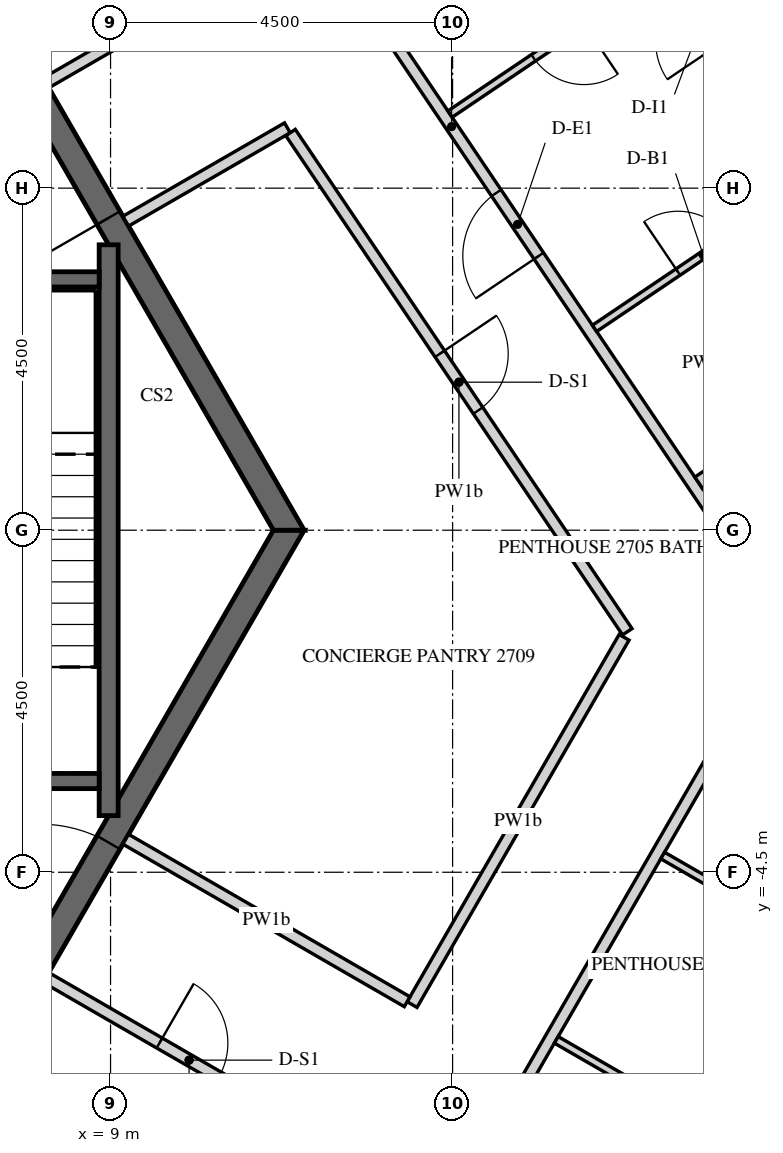
"""IFC4 building model, lengths in metres.
Left out: names, types, materials, properties, quantities, classifications, styles, units other than length and angle.
Written with IfcOpenShell. Run it as: python <this file> out.ifc"""

import sys

from ifc_helpers import new_model, si_unit, direction, frame, frame_2d, origin, place, context, subcontext, project, spatial, polyline, rectangle, outline, extrude, element, fill, save


model = new_model("IFC4")
c1 = context("Model", 3, precision=1e-05, world=origin(), true_north=direction((0.0, 1.0)))
c2 = subcontext(c1, "Body", "Model", "MODEL_VIEW")
j1 = project(units=[si_unit("LENGTHUNIT", "METRE"), si_unit("PLANEANGLEUNIT", "RADIAN")], contexts=[c1])
p1 = place(None, origin())
s1 = spatial("IfcSite", under=j1, at=p1, CompositionType="ELEMENT")
p2 = place(p1, origin())
s2 = spatial("IfcBuilding", under=s1, at=p2, CompositionType="ELEMENT")
p3 = place(p2, frame((0.0, 0.0, 349.5)))
s3 = spatial("IfcBuildingStorey", under=s2, at=p3, CompositionType="ELEMENT", Elevation=349.5)
p4 = place(p3, frame((15.273, -21.097, 0.0), z_axis=(0.0, 0.0, 1.0), x_axis=(0.499997453958, 0.866026873738, 0.0)))
e1 = element("IfcWall", 1, at=p4, inside=s3, PredefinedType="SOLIDWALL", context=c2, shape_type="SweptSolid", body=[
    extrude(outline(polyline([(-0.018, -0.225), (23.152, -0.225), (23.11, 0.225), (0.018, 0.225), (-0.018, -0.225)])), origin(), (0.0, 0.0, 1.0), 3.75),
])
p5 = place(p4, frame((1.366, 0.0, 0.3)))
e2 = element("IfcOpeningElement", 2, at=p5, cuts=e1, PredefinedType="OPENING", context=c2, shape_type="SweptSolid", body=[
    extrude(rectangle(XDim=2.4, YDim=3.0, at=frame_2d((1.2, 1.5))), frame((0.0, 0.235, 0.0), z_axis=(0.0, -1.0, 0.0), x_axis=(1.0, 0.0, 0.0)), (0.0, 0.0, 1.0), 0.47),
])
p6 = place(p4, frame((4.966, 0.0, 0.3)))
e3 = element("IfcOpeningElement", 3, at=p6, cuts=e1, PredefinedType="OPENING", context=c2, shape_type="SweptSolid", body=[
    extrude(rectangle(XDim=2.4, YDim=3.0, at=frame_2d((1.2, 1.5))), frame((0.0, 0.235, 0.0), z_axis=(0.0, -1.0, 0.0), x_axis=(1.0, 0.0, 0.0)), (0.0, 0.0, 1.0), 0.47),
])
p7 = place(p4, frame((8.566, 0.0, 0.3)))
e4 = element("IfcOpeningElement", 4, at=p7, cuts=e1, PredefinedType="OPENING", context=c2, shape_type="SweptSolid", body=[
    extrude(rectangle(XDim=2.4, YDim=3.0, at=frame_2d((1.2, 1.5))), frame((0.0, 0.235, 0.0), z_axis=(0.0, -1.0, 0.0), x_axis=(1.0, 0.0, 0.0)), (0.0, 0.0, 1.0), 0.47),
])
p8 = place(p4, frame((12.166, 0.0, 0.3)))
e5 = element("IfcOpeningElement", 5, at=p8, cuts=e1, PredefinedType="OPENING", context=c2, shape_type="SweptSolid", body=[
    extrude(rectangle(XDim=2.4, YDim=3.0, at=frame_2d((1.2, 1.5))), frame((0.0, 0.235, 0.0), z_axis=(0.0, -1.0, 0.0), x_axis=(1.0, 0.0, 0.0)), (0.0, 0.0, 1.0), 0.47),
])
p9 = place(p4, frame((15.766, 0.0, 0.3)))
e6 = element("IfcOpeningElement", 6, at=p9, cuts=e1, PredefinedType="OPENING", context=c2, shape_type="SweptSolid", body=[
    extrude(rectangle(XDim=2.4, YDim=3.0, at=frame_2d((1.2, 1.5))), frame((0.0, 0.235, 0.0), z_axis=(0.0, -1.0, 0.0), x_axis=(1.0, 0.0, 0.0)), (0.0, 0.0, 1.0), 0.47),
])
p10 = place(p4, frame((19.366, 0.0, 0.3)))
e7 = element("IfcOpeningElement", 7, at=p10, cuts=e1, PredefinedType="OPENING", context=c2, shape_type="SweptSolid", body=[
    extrude(rectangle(XDim=2.4, YDim=3.0, at=frame_2d((1.2, 1.5))), frame((0.0, 0.235, 0.0), z_axis=(0.0, -1.0, 0.0), x_axis=(1.0, 0.0, 0.0)), (0.0, 0.0, 1.0), 0.47),
])
p11 = place(p3, frame((24.37, 2.811, 0.0), z_axis=(0.0, 0.0, 1.0), x_axis=(-0.559187034749, 0.829041531027, 0.0)))
e8 = element("IfcWall", 8, at=p11, inside=s3, PredefinedType="SOLIDWALL", context=c2, shape_type="SweptSolid", body=[
    extrude(outline(polyline([(0.225, -0.225), (20.506, -0.225), (20.957, 0.225), (-0.225, 0.225), (0.225, -0.225)])), origin(), (0.0, 0.0, 1.0), 3.75),
])
p12 = place(p11, frame((0.325, 0.0, 0.9)))
e9 = element("IfcOpeningElement", 9, at=p12, cuts=e8, PredefinedType="OPENING", context=c2, shape_type="SweptSolid", body=[
    extrude(rectangle(XDim=0.9, YDim=1.5, at=frame_2d((0.45, 0.75))), frame((0.0, 0.235, 0.0), z_axis=(0.0, -1.0, 0.0), x_axis=(1.0, 0.0, 0.0)), (0.0, 0.0, 1.0), 0.47),
])
p13 = place(p11, frame((1.525, 0.0, 0.0)))
e10 = element("IfcOpeningElement", 10, at=p13, cuts=e8, PredefinedType="OPENING", context=c2, shape_type="SweptSolid", body=[
    extrude(rectangle(XDim=1.2, YDim=2.4, at=frame_2d((0.6, 1.2))), frame((0.0, 0.235, 0.0), z_axis=(0.0, -1.0, 0.0), x_axis=(1.0, 0.0, 0.0)), (0.0, 0.0, 1.0), 0.47),
])
p14 = place(p11, frame((3.766, 0.0, 0.9)))
e11 = element("IfcOpeningElement", 11, at=p14, cuts=e8, PredefinedType="OPENING", context=c2, shape_type="SweptSolid", body=[
    extrude(rectangle(XDim=0.9, YDim=1.5, at=frame_2d((0.45, 0.75))), frame((0.0, 0.235, 0.0), z_axis=(0.0, -1.0, 0.0), x_axis=(1.0, 0.0, 0.0)), (0.0, 0.0, 1.0), 0.47),
])
p15 = place(p11, frame((4.966, 0.0, 0.0)))
e12 = element("IfcOpeningElement", 12, at=p15, cuts=e8, PredefinedType="OPENING", context=c2, shape_type="SweptSolid", body=[
    extrude(rectangle(XDim=1.2, YDim=2.4, at=frame_2d((0.6, 1.2))), frame((0.0, 0.235, 0.0), z_axis=(0.0, -1.0, 0.0), x_axis=(1.0, 0.0, 0.0)), (0.0, 0.0, 1.0), 0.47),
])
p16 = place(p11, frame((7.366, 0.0, 0.9)))
e13 = element("IfcOpeningElement", 13, at=p16, cuts=e8, PredefinedType="OPENING", context=c2, shape_type="SweptSolid", body=[
    extrude(rectangle(XDim=0.9, YDim=1.5, at=frame_2d((0.45, 0.75))), frame((0.0, 0.235, 0.0), z_axis=(0.0, -1.0, 0.0), x_axis=(1.0, 0.0, 0.0)), (0.0, 0.0, 1.0), 0.47),
])
p17 = place(p11, frame((8.566, 0.0, 0.0)))
e14 = element("IfcOpeningElement", 14, at=p17, cuts=e8, PredefinedType="OPENING", context=c2, shape_type="SweptSolid", body=[
    extrude(rectangle(XDim=1.2, YDim=2.4, at=frame_2d((0.6, 1.2))), frame((0.0, 0.235, 0.0), z_axis=(0.0, -1.0, 0.0), x_axis=(1.0, 0.0, 0.0)), (0.0, 0.0, 1.0), 0.47),
])
p18 = place(p11, frame((10.966, 0.0, 0.9)))
e15 = element("IfcOpeningElement", 15, at=p18, cuts=e8, PredefinedType="OPENING", context=c2, shape_type="SweptSolid", body=[
    extrude(rectangle(XDim=0.9, YDim=1.5, at=frame_2d((0.45, 0.75))), frame((0.0, 0.235, 0.0), z_axis=(0.0, -1.0, 0.0), x_axis=(1.0, 0.0, 0.0)), (0.0, 0.0, 1.0), 0.47),
])
p19 = place(p11, frame((12.166, 0.0, 0.0)))
e16 = element("IfcOpeningElement", 16, at=p19, cuts=e8, PredefinedType="OPENING", context=c2, shape_type="SweptSolid", body=[
    extrude(rectangle(XDim=1.2, YDim=2.4, at=frame_2d((0.6, 1.2))), frame((0.0, 0.235, 0.0), z_axis=(0.0, -1.0, 0.0), x_axis=(1.0, 0.0, 0.0)), (0.0, 0.0, 1.0), 0.47),
])
p20 = place(p11, frame((14.566, 0.0, 0.9)))
e17 = element("IfcOpeningElement", 17, at=p20, cuts=e8, PredefinedType="OPENING", context=c2, shape_type="SweptSolid", body=[
    extrude(rectangle(XDim=0.9, YDim=1.5, at=frame_2d((0.45, 0.75))), frame((0.0, 0.235, 0.0), z_axis=(0.0, -1.0, 0.0), x_axis=(1.0, 0.0, 0.0)), (0.0, 0.0, 1.0), 0.47),
])
p21 = place(p11, frame((15.766, 0.0, 0.0)))
e18 = element("IfcOpeningElement", 18, at=p21, cuts=e8, PredefinedType="OPENING", context=c2, shape_type="SweptSolid", body=[
    extrude(rectangle(XDim=1.2, YDim=2.4, at=frame_2d((0.6, 1.2))), frame((0.0, 0.235, 0.0), z_axis=(0.0, -1.0, 0.0), x_axis=(1.0, 0.0, 0.0)), (0.0, 0.0, 1.0), 0.47),
])
p22 = place(p11, frame((18.007, 0.0, 0.9)))
e19 = element("IfcOpeningElement", 19, at=p22, cuts=e8, PredefinedType="OPENING", context=c2, shape_type="SweptSolid", body=[
    extrude(rectangle(XDim=0.9, YDim=1.5, at=frame_2d((0.45, 0.75))), frame((0.0, 0.235, 0.0), z_axis=(0.0, -1.0, 0.0), x_axis=(1.0, 0.0, 0.0)), (0.0, 0.0, 1.0), 0.47),
])
p23 = place(p11, frame((19.207, 0.0, 0.0)))
e20 = element("IfcOpeningElement", 20, at=p23, cuts=e8, PredefinedType="OPENING", context=c2, shape_type="SweptSolid", body=[
    extrude(rectangle(XDim=1.2, YDim=2.4, at=frame_2d((0.6, 1.2))), frame((0.0, 0.235, 0.0), z_axis=(0.0, -1.0, 0.0), x_axis=(1.0, 0.0, 0.0)), (0.0, 0.0, 1.0), 0.47),
])
p24 = place(p3, frame((5.673, -9.825, 0.0), z_axis=(0.0, 0.0, 1.0), x_axis=(0.499995046907, 0.866028263435, 0.0)))
e21 = element("IfcWall", 21, at=p24, inside=s3, PredefinedType="SHEAR", context=c2, shape_type="SweptSolid", body=[
    extrude(outline(polyline([(-0.101, -0.175), (11.446, -0.175), (11.244, 0.175), (0.101, 0.175), (-0.101, -0.175)])), origin(), (0.0, 0.0, 1.0), 3.75),
])
p25 = place(p24, frame((4.801, 0.0, 0.0)))
e22 = element("IfcOpeningElement", 22, at=p25, cuts=e21, PredefinedType="OPENING", context=c2, shape_type="SweptSolid", body=[
    extrude(rectangle(XDim=1.8, YDim=2.4, at=frame_2d((0.9, 1.2))), frame((0.0, 0.185, 0.0), z_axis=(0.0, -1.0, 0.0), x_axis=(1.0, 0.0, 0.0)), (0.0, 0.0, 1.0), 0.37),
])
p26 = place(p3, frame((11.345, 0.0, 0.0), z_axis=(0.0, 0.0, 1.0), x_axis=(-0.499995046907, 0.866028263435, 0.0)))
e23 = element("IfcWall", 23, at=p26, inside=s3, PredefinedType="SHEAR", context=c2, shape_type="SweptSolid", body=[
    extrude(outline(polyline([(-0.101, -0.175), (11.446, -0.175), (11.244, 0.175), (0.101, 0.175), (-0.101, -0.175)])), origin(), (0.0, 0.0, 1.0), 3.75),
])
p27 = place(p26, frame((4.744, 0.0, 0.0)))
e24 = element("IfcOpeningElement", 24, at=p27, cuts=e23, PredefinedType="OPENING", context=c2, shape_type="SweptSolid", body=[
    extrude(rectangle(XDim=1.8, YDim=2.4, at=frame_2d((0.9, 1.2))), frame((0.0, 0.185, 0.0), z_axis=(0.0, -1.0, 0.0), x_axis=(1.0, 0.0, 0.0)), (0.0, 0.0, 1.0), 0.37),
])
p28 = place(p3, frame((8.975, -3.755, -0.5), z_axis=(0.0, 0.0, 1.0), x_axis=(0.0, 1.0, 0.0)))
e25 = element("IfcWall", 25, at=p28, inside=s3, PredefinedType="SHEAR", context=c2, shape_type="SweptSolid", body=[
    extrude(rectangle(XDim=7.51, YDim=0.25, at=frame_2d((3.755, 0.0))), origin(), (0.0, 0.0, 1.0), 4.15),
])
p29 = place(p3, frame((5.9, 3.3, -0.5), z_axis=(0.0, 0.0, 1.0), x_axis=(1.0, 0.0, 0.0)))
e26 = element("IfcWall", 26, at=p29, inside=s3, PredefinedType="SHEAR", context=c2, shape_type="SweptSolid", body=[
    extrude(rectangle(XDim=2.95, YDim=0.2, at=frame_2d((1.475, 0.0))), origin(), (0.0, 0.0, 1.0), 4.15),
])
p30 = place(p3, frame((5.9, -3.3, -0.5), z_axis=(0.0, 0.0, 1.0), x_axis=(1.0, 0.0, 0.0)))
e27 = element("IfcWall", 27, at=p30, inside=s3, PredefinedType="SHEAR", context=c2, shape_type="SweptSolid", body=[
    extrude(rectangle(XDim=2.95, YDim=0.2, at=frame_2d((1.475, 0.0))), origin(), (0.0, 0.0, 1.0), 4.15),
])
p31 = place(p30, frame((0.875, 0.0, 0.5)))
e28 = element("IfcOpeningElement", 28, at=p31, cuts=e27, PredefinedType="OPENING", context=c2, shape_type="SweptSolid", body=[
    extrude(rectangle(XDim=1.2, YDim=2.4, at=frame_2d((0.6, 1.2))), frame((0.0, 0.11, 0.0), z_axis=(0.0, -1.0, 0.0), x_axis=(1.0, 0.0, 0.0)), (0.0, 0.0, 1.0), 0.22),
])
p32 = place(p3, frame((10.937, -13.357, 0.0), z_axis=(0.0, 0.0, 1.0), x_axis=(0.499993317597, 0.866029261837, 0.0)))
e29 = element("IfcWall", 29, at=p32, inside=s3, PredefinedType="PARTITIONING", context=c2, shape_type="SweptSolid", body=[
    extrude(rectangle(XDim=13.966, YDim=0.15, at=frame_2d((6.983, 0.0))), origin(), (0.0, 0.0, 1.0), 2.82),
])
p33 = place(p32, frame((3.325, 0.0, 0.0)))
e30 = element("IfcOpeningElement", 30, at=p33, cuts=e29, PredefinedType="OPENING", context=c2, shape_type="SweptSolid", body=[
    extrude(rectangle(XDim=1.0, YDim=2.1, at=frame_2d((0.5, 1.05))), frame((0.0, 0.085, 0.0), z_axis=(0.0, -1.0, 0.0), x_axis=(1.0, 0.0, 0.0)), (0.0, 0.0, 1.0), 0.17),
])
p34 = place(p3, frame((17.873, -1.193, 0.0), z_axis=(0.0, 0.0, 1.0), x_axis=(-0.559195650252, 0.829035719821, 0.0)))
e31 = element("IfcWall", 31, at=p34, inside=s3, PredefinedType="PARTITIONING", context=c2, shape_type="SweptSolid", body=[
    extrude(rectangle(XDim=15.688, YDim=0.15, at=frame_2d((7.844, 0.0))), origin(), (0.0, 0.0, 1.0), 2.82),
])
p35 = place(p34, frame((5.792, 0.0, 0.0)))
e32 = element("IfcOpeningElement", 32, at=p35, cuts=e31, PredefinedType="OPENING", context=c2, shape_type="SweptSolid", body=[
    extrude(rectangle(XDim=1.0, YDim=2.1, at=frame_2d((0.5, 1.05))), frame((0.0, 0.085, 0.0), z_axis=(0.0, -1.0, 0.0), x_axis=(1.0, 0.0, 0.0)), (0.0, 0.0, 1.0), 0.17),
])
p36 = place(p3, frame((9.2, 4.066, 0.0), z_axis=(0.0, 0.0, 1.0), x_axis=(0.866038240688, 0.499977765172, 0.0)))
e33 = element("IfcWall", 33, at=p36, inside=s3, PredefinedType="PARTITIONING", context=c2, shape_type="SweptSolid", body=[
    extrude(rectangle(XDim=2.456, YDim=0.15, at=frame_2d((1.228, 0.0))), origin(), (0.0, 0.0, 1.0), 2.82),
])
p37 = place(p3, frame((11.368, 5.231, 0.0), z_axis=(0.0, 0.0, 1.0), x_axis=(0.55919388604, -0.829036909803, 0.0)))
e34 = element("IfcWall", 34, at=p37, inside=s3, PredefinedType="PARTITIONING", context=c2, shape_type="SweptSolid", body=[
    extrude(rectangle(XDim=7.922, YDim=0.15, at=frame_2d((3.961, 0.0))), origin(), (0.0, 0.0, 1.0), 2.82),
])
p38 = place(p37, frame((3.511, 0.0, 0.0)))
e35 = element("IfcOpeningElement", 35, at=p38, cuts=e34, PredefinedType="OPENING", context=c2, shape_type="SweptSolid", body=[
    extrude(rectangle(XDim=0.9, YDim=2.1, at=frame_2d((0.45, 1.05))), frame((0.0, 0.085, 0.0), z_axis=(0.0, -1.0, 0.0), x_axis=(1.0, 0.0, 0.0)), (0.0, 0.0, 1.0), 0.17),
])
p39 = place(p3, frame((15.757, -1.409, 0.0), z_axis=(0.0, 0.0, 1.0), x_axis=(-0.500002739321, -0.866023822231, 0.0)))
e36 = element("IfcWall", 36, at=p39, inside=s3, PredefinedType="PARTITIONING", context=c2, shape_type="SweptSolid", body=[
    extrude(rectangle(XDim=5.58, YDim=0.15, at=frame_2d((2.79, 0.0))), origin(), (0.0, 0.0, 1.0), 2.82),
])
p40 = place(p3, frame((12.902, -6.203, 0.0), z_axis=(0.0, 0.0, 1.0), x_axis=(-0.866023907196, 0.500002592159, 0.0)))
e37 = element("IfcWall", 37, at=p40, inside=s3, PredefinedType="PARTITIONING", context=c2, shape_type="SweptSolid", body=[
    extrude(rectangle(XDim=4.275, YDim=0.15, at=frame_2d((2.137, 0.0))), origin(), (0.0, 0.0, 1.0), 2.82),
])
p41 = place(p3, frame((8.15, -5.884, 0.0), z_axis=(0.0, 0.0, 1.0), x_axis=(0.866027639635, -0.499996127374, 0.0)))
e38 = element("IfcWall", 38, at=p41, inside=s3, PredefinedType="PARTITIONING", context=c2, shape_type="SweptSolid", body=[
    extrude(rectangle(XDim=4.35, YDim=0.15, at=frame_2d((2.175, 0.0))), origin(), (0.0, 0.0, 1.0), 2.82),
])
p42 = place(p41, frame((1.725, 0.0, 0.0)))
e39 = element("IfcOpeningElement", 39, at=p42, cuts=e38, PredefinedType="OPENING", context=c2, shape_type="SweptSolid", body=[
    extrude(rectangle(XDim=0.9, YDim=2.1, at=frame_2d((0.45, 1.05))), frame((0.0, 0.085, 0.0), z_axis=(0.0, -1.0, 0.0), x_axis=(1.0, 0.0, 0.0)), (0.0, 0.0, 1.0), 0.17),
])
p43 = place(p3, frame((10.084, 7.001, 0.0), z_axis=(0.0, 0.0, 1.0), x_axis=(-0.865994457699, -0.500053596362, 0.0)))
e40 = element("IfcWall", 40, at=p43, inside=s3, PredefinedType="PARTITIONING", context=c2, shape_type="SweptSolid", body=[
    extrude(rectangle(XDim=2.234, YDim=0.15, at=frame_2d((1.117, 0.0))), origin(), (0.0, 0.0, 1.0), 2.82),
])
p44 = place(p3, frame((16.264, -4.28, 0.0), z_axis=(0.0, 0.0, 1.0), x_axis=(0.866037464623, -0.499979109433, 0.0)))
e41 = element("IfcWall", 41, at=p44, inside=s3, PredefinedType="PARTITIONING", context=c2, shape_type="SweptSolid", body=[
    extrude(rectangle(XDim=3.925, YDim=0.1, at=frame_2d((1.962, 0.0))), origin(), (0.0, 0.0, 1.0), 2.82),
])
p45 = place(p3, frame((19.66, 2.595, 0.0), z_axis=(0.0, 0.0, 1.0), x_axis=(-0.829033300448, -0.559199237078, 0.0)))
e42 = element("IfcWall", 42, at=p45, inside=s3, PredefinedType="PARTITIONING", context=c2, shape_type="SweptSolid", body=[
    extrude(rectangle(XDim=3.525, YDim=0.18, at=frame_2d((1.763, 0.0))), origin(), (0.0, 0.0, 1.0), 2.82),
])
p46 = place(p3, frame((18.22, -8.642, 0.0), z_axis=(0.0, 0.0, 1.0), x_axis=(-0.866016658288, 0.500015147339, 0.0)))
e43 = element("IfcWall", 43, at=p46, inside=s3, PredefinedType="PARTITIONING", context=c2, shape_type="SweptSolid", body=[
    extrude(rectangle(XDim=3.875, YDim=0.1, at=frame_2d((1.938, 0.0))), origin(), (0.0, 0.0, 1.0), 2.82),
])
p47 = place(p3, frame((15.367, 2.655, 0.0), z_axis=(0.0, 0.0, 1.0), x_axis=(0.829033300448, 0.559199237078, 0.0)))
e44 = element("IfcWall", 44, at=p47, inside=s3, PredefinedType="PARTITIONING", context=c2, shape_type="SweptSolid", body=[
    extrude(rectangle(XDim=3.525, YDim=0.1, at=frame_2d((1.763, 0.0))), origin(), (0.0, 0.0, 1.0), 2.82),
])
p48 = place(p47, frame((1.325, 0.0, 0.0)))
e45 = element("IfcOpeningElement", 45, at=p48, cuts=e44, PredefinedType="OPENING", context=c2, shape_type="SweptSolid", body=[
    extrude(rectangle(XDim=0.8, YDim=2.1, at=frame_2d((0.4, 1.05))), frame((0.0, 0.06, 0.0), z_axis=(0.0, -1.0, 0.0), x_axis=(1.0, 0.0, 0.0)), (0.0, 0.0, 1.0), 0.12),
])
p49 = place(p3, frame((18.291, 4.625, 0.0), z_axis=(0.0, 0.0, 1.0), x_axis=(-0.55916115895, 0.82905898362, 0.0)))
e46 = element("IfcWall", 46, at=p49, inside=s3, PredefinedType="PARTITIONING", context=c2, shape_type="SweptSolid", body=[
    extrude(rectangle(XDim=3.404, YDim=0.1, at=frame_2d((1.702, 0.0))), origin(), (0.0, 0.0, 1.0), 2.82),
])
p50 = place(p49, frame((0.762, 0.0, 0.0)))
e47 = element("IfcOpeningElement", 47, at=p50, cuts=e46, PredefinedType="OPENING", context=c2, shape_type="SweptSolid", body=[
    extrude(rectangle(XDim=0.9, YDim=2.1, at=frame_2d((0.45, 1.05))), frame((0.0, 0.06, 0.0), z_axis=(0.0, -1.0, 0.0), x_axis=(1.0, 0.0, 0.0)), (0.0, 0.0, 1.0), 0.12),
])
p51 = place(p49, frame((2.182, 0.0, 0.0)))
e48 = element("IfcOpeningElement", 48, at=p51, cuts=e46, PredefinedType="OPENING", context=c2, shape_type="SweptSolid", body=[
    extrude(rectangle(XDim=0.9, YDim=2.1, at=frame_2d((0.45, 1.05))), frame((0.0, 0.06, 0.0), z_axis=(0.0, -1.0, 0.0), x_axis=(1.0, 0.0, 0.0)), (0.0, 0.0, 1.0), 0.12),
])
p52 = place(p3, frame((16.388, 7.445, 0.0), z_axis=(0.0, 0.0, 1.0), x_axis=(-0.829033300448, -0.559199237078, 0.0)))
e49 = element("IfcWall", 49, at=p52, inside=s3, PredefinedType="PARTITIONING", context=c2, shape_type="SweptSolid", body=[
    extrude(rectangle(XDim=3.525, YDim=0.1, at=frame_2d((1.763, 0.0))), origin(), (0.0, 0.0, 1.0), 2.82),
])
p53 = place(p52, frame((1.4, 0.0, 0.0)))
e50 = element("IfcOpeningElement", 50, at=p53, cuts=e49, PredefinedType="OPENING", context=c2, shape_type="SweptSolid", body=[
    extrude(rectangle(XDim=0.8, YDim=2.1, at=frame_2d((0.4, 1.05))), frame((0.0, 0.06, 0.0), z_axis=(0.0, -1.0, 0.0), x_axis=(1.0, 0.0, 0.0)), (0.0, 0.0, 1.0), 0.12),
])
p54 = place(p27, origin())
e51 = element("IfcDoor", 51, at=p54, inside=s3, OperationType="DOUBLE_DOOR_SINGLE_SWING", PredefinedType="DOOR", context=c2, shape_type="SweptSolid", body=[
    extrude(rectangle(XDim=1.8, YDim=2.4, at=frame_2d((0.9, 1.2))), frame((0.0, 0.025, 0.0), z_axis=(0.0, -1.0, 0.0), x_axis=(1.0, 0.0, 0.0)), (0.0, 0.0, 1.0), 0.05),
])
fill(e24, e51)
p55 = place(p25, origin())
e52 = element("IfcDoor", 52, at=p55, inside=s3, OperationType="DOUBLE_DOOR_SINGLE_SWING", PredefinedType="DOOR", context=c2, shape_type="SweptSolid", body=[
    extrude(rectangle(XDim=1.8, YDim=2.4, at=frame_2d((0.9, 1.2))), frame((0.0, 0.025, 0.0), z_axis=(0.0, -1.0, 0.0), x_axis=(1.0, 0.0, 0.0)), (0.0, 0.0, 1.0), 0.05),
])
fill(e22, e52)
p56 = place(p35, origin())
e53 = element("IfcDoor", 53, at=p56, inside=s3, OperationType="SINGLE_SWING_LEFT", PredefinedType="DOOR", context=c2, shape_type="SweptSolid", body=[
    extrude(rectangle(XDim=1.0, YDim=2.1, at=frame_2d((0.5, 1.05))), frame((0.0, 0.025, 0.0), z_axis=(0.0, -1.0, 0.0), x_axis=(1.0, 0.0, 0.0)), (0.0, 0.0, 1.0), 0.05),
])
fill(e32, e53)
p57 = place(p48, origin())
e54 = element("IfcDoor", 54, at=p57, inside=s3, OperationType="SINGLE_SWING_RIGHT", PredefinedType="DOOR", context=c2, shape_type="SweptSolid", body=[
    extrude(rectangle(XDim=0.8, YDim=2.1, at=frame_2d((0.4, 1.05))), frame((0.0, 0.025, 0.0), z_axis=(0.0, -1.0, 0.0), x_axis=(1.0, 0.0, 0.0)), (0.0, 0.0, 1.0), 0.05),
])
fill(e45, e54)
p58 = place(p53, origin())
e55 = element("IfcDoor", 55, at=p58, inside=s3, OperationType="SINGLE_SWING_LEFT", PredefinedType="DOOR", context=c2, shape_type="SweptSolid", body=[
    extrude(rectangle(XDim=0.8, YDim=2.1, at=frame_2d((0.4, 1.05))), frame((0.0, 0.025, 0.0), z_axis=(0.0, -1.0, 0.0), x_axis=(1.0, 0.0, 0.0)), (0.0, 0.0, 1.0), 0.05),
])
fill(e50, e55)
p59 = place(p38, origin())
e56 = element("IfcDoor", 56, at=p59, inside=s3, OperationType="SINGLE_SWING_RIGHT", PredefinedType="DOOR", context=c2, shape_type="SweptSolid", body=[
    extrude(rectangle(XDim=0.9, YDim=2.1, at=frame_2d((0.45, 1.05))), frame((0.0, 0.025, 0.0), z_axis=(0.0, -1.0, 0.0), x_axis=(1.0, 0.0, 0.0)), (0.0, 0.0, 1.0), 0.05),
])
fill(e35, e56)
p60 = place(p42, origin())
e57 = element("IfcDoor", 57, at=p60, inside=s3, OperationType="SINGLE_SWING_LEFT", PredefinedType="DOOR", context=c2, shape_type="SweptSolid", body=[
    extrude(rectangle(XDim=0.9, YDim=2.1, at=frame_2d((0.45, 1.05))), frame((0.0, 0.025, 0.0), z_axis=(0.0, -1.0, 0.0), x_axis=(1.0, 0.0, 0.0)), (0.0, 0.0, 1.0), 0.05),
])
fill(e39, e57)
save(model, sys.argv[1])
